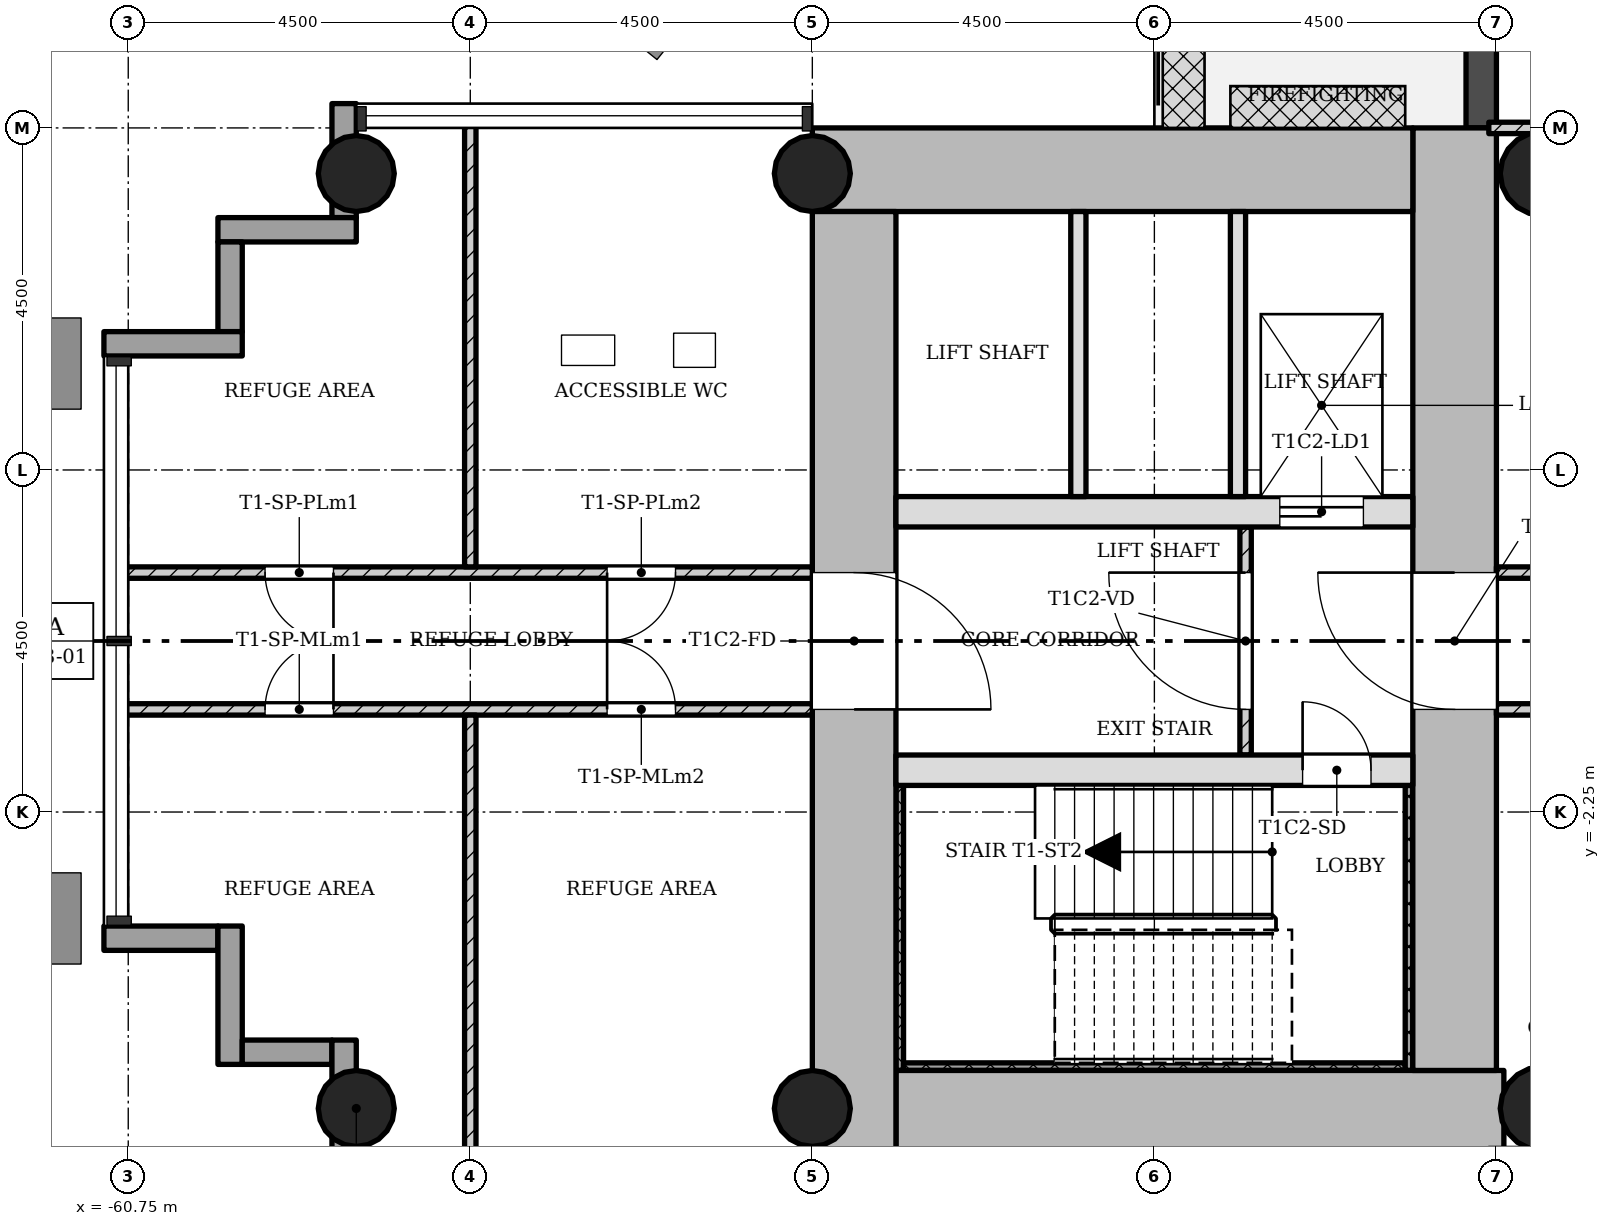
"""IFC4 building model, lengths in metres.
Left out: names, types, materials, properties, quantities, classifications, styles, units other than length and angle.
Written with IfcOpenShell. Run it as: python <this file> out.ifc"""

import sys

from ifc_helpers import new_model, si_unit, direction, frame, frame_2d, origin, origin_2d, place, context, subcontext, project, spatial, rectangle, hollow_circle, extrude, element, fill, save


model = new_model("IFC4")
c1 = context("Model", 3, precision=1e-05, world=origin(), true_north=direction((0.0, 1.0)))
c2 = subcontext(c1, "Body", "Model", "MODEL_VIEW")
j1 = project(units=[si_unit("LENGTHUNIT", "METRE"), si_unit("PLANEANGLEUNIT", "RADIAN")], contexts=[c1])
p1 = place(None, origin())
s1 = spatial("IfcSite", under=j1, at=p1, CompositionType="ELEMENT")
p2 = place(p1, origin())
s2 = spatial("IfcBuilding", under=s1, at=p2, CompositionType="ELEMENT")
p3 = place(p2, frame((0.0, 0.0, 72.1)))
s3 = spatial("IfcBuildingStorey", under=s2, at=p3, CompositionType="ELEMENT", Elevation=72.1)
p4 = place(p3, frame((-50.65, -6.2, 0.0), z_axis=(0.0, 0.0, 1.0), x_axis=(1.0, 0.0, 0.0)))
e1 = element("IfcWall", 1, at=p4, inside=s3, PredefinedType="SHEAR", context=c2, shape_type="SweptSolid", body=[
    extrude(rectangle(XDim=7.998, YDim=1.1, at=frame_2d((3.999, 0.0))), origin(), (0.0, 0.0, 1.0), 4.5),
])
p5 = place(p3, frame((-43.3, -5.65, 0.0), z_axis=(0.0, 0.0, 1.0), x_axis=(0.0, 1.0, 0.0)))
e2 = element("IfcWall", 2, at=p5, inside=s3, PredefinedType="SHEAR", context=c2, shape_type="SweptSolid", body=[
    extrude(rectangle(XDim=12.4, YDim=1.1, at=frame_2d((6.2, 0.0))), origin(), (0.0, 0.0, 1.0), 4.5),
])
p6 = place(p5, frame((4.75, 0.0, 0.0)))
e3 = element("IfcOpeningElement", 3, at=p6, cuts=e2, PredefinedType="OPENING", context=c2, shape_type="SweptSolid", body=[
    extrude(rectangle(XDim=1.8, YDim=2.1, at=frame_2d((0.9, 1.05))), frame((0.0, 0.56, 0.0), z_axis=(0.0, -1.0, 0.0), x_axis=(1.0, 0.0, 0.0)), (0.0, 0.0, 1.0), 1.12),
])
p7 = place(p3, frame((-43.85, 6.2, 0.0), z_axis=(0.0, 0.0, 1.0), x_axis=(-1.0, 0.0, 0.0)))
e4 = element("IfcWall", 4, at=p7, inside=s3, PredefinedType="SHEAR", context=c2, shape_type="SweptSolid", body=[
    extrude(rectangle(XDim=7.9, YDim=1.1, at=frame_2d((3.95, 0.0))), origin(), (0.0, 0.0, 1.0), 4.5),
])
p8 = place(p3, frame((-51.2, 5.65, 0.0), z_axis=(0.0, 0.0, 1.0), x_axis=(0.0, -1.0, 0.0)))
e5 = element("IfcWall", 5, at=p8, inside=s3, PredefinedType="SHEAR", context=c2, shape_type="SweptSolid", body=[
    extrude(rectangle(XDim=12.4, YDim=1.1, at=frame_2d((6.2, 0.0))), origin(), (0.0, 0.0, 1.0), 4.5),
])
p9 = place(p8, frame((4.75, 0.0, 0.0)))
e6 = element("IfcOpeningElement", 6, at=p9, cuts=e5, PredefinedType="OPENING", context=c2, shape_type="SweptSolid", body=[
    extrude(rectangle(XDim=1.8, YDim=2.1, at=frame_2d((0.9, 1.05))), frame((0.0, 0.56, 0.0), z_axis=(0.0, -1.0, 0.0), x_axis=(1.0, 0.0, 0.0)), (0.0, 0.0, 1.0), 1.12),
])
p10 = place(p3, frame((-50.65, -1.7, 0.0), z_axis=(0.0, 0.0, 1.0), x_axis=(1.0, 0.0, 0.0)))
e7 = element("IfcWall", 7, at=p10, inside=s3, PredefinedType="SHEAR", context=c2, shape_type="SweptSolid", body=[
    extrude(rectangle(XDim=6.8, YDim=0.4, at=frame_2d((3.4, 0.0))), origin(), (0.0, 0.0, 1.0), 4.5),
])
p11 = place(p10, frame((5.35, 0.0, 0.0)))
e8 = element("IfcOpeningElement", 8, at=p11, cuts=e7, PredefinedType="OPENING", context=c2, shape_type="SweptSolid", body=[
    extrude(rectangle(XDim=0.9, YDim=2.1, at=frame_2d((0.45, 1.05))), frame((0.0, 0.21, 0.0), z_axis=(0.0, -1.0, 0.0), x_axis=(1.0, 0.0, 0.0)), (0.0, 0.0, 1.0), 0.42),
])
p12 = place(p3, frame((-50.65, 1.7, 0.0), z_axis=(0.0, 0.0, 1.0), x_axis=(1.0, 0.0, 0.0)))
e9 = element("IfcWall", 9, at=p12, inside=s3, PredefinedType="SHEAR", context=c2, shape_type="SweptSolid", body=[
    extrude(rectangle(XDim=6.8, YDim=0.4, at=frame_2d((3.4, 0.0))), origin(), (0.0, 0.0, 1.0), 4.5),
])
p13 = place(p12, frame((5.05, 0.0, 0.0)))
e10 = element("IfcOpeningElement", 10, at=p13, cuts=e9, PredefinedType="OPENING", context=c2, shape_type="SweptSolid", body=[
    extrude(rectangle(XDim=1.1, YDim=2.1, at=frame_2d((0.55, 1.05))), frame((0.0, 0.21, 0.0), z_axis=(0.0, -1.0, 0.0), x_axis=(1.0, 0.0, 0.0)), (0.0, 0.0, 1.0), 0.42),
])
for number, where, z_axis, x_axis in (
    (11, (-51.75, -6.15, 0.0), (0.0, 0.0, 1.0), (1.0, 0.0, 0.0)),
    (12, (-51.75, 6.15, 0.0), (0.0, 0.0, 1.0), (1.0, 0.0, 0.0)),
    (13, (-57.75, -6.15, 0.0), (0.0, 0.0, 1.0), (1.0, 0.0, 0.0)),
    (14, (-57.75, 6.15, 0.0), (0.0, 0.0, 1.0), (1.0, 0.0, 0.0)),
):
    element("IfcColumn", number, at=place(p3, frame(where, z_axis=z_axis, x_axis=x_axis)), inside=s3, PredefinedType="COLUMN", context=c2, shape_type="SweptSolid", body=[
        extrude(hollow_circle(Radius=0.5, WallThickness=0.036, at=origin_2d()), origin(), (0.0, 0.0, 1.0), 4.5),
    ])
for number, where, z_axis, x_axis in (
    (15, (-42.15, -6.15, 0.0), (0.0, 0.0, 1.0), (1.0, 0.0, 0.0)),
    (16, (-42.15, 6.15, 0.0), (0.0, 0.0, 1.0), (1.0, 0.0, 0.0)),
):
    element("IfcColumn", number, at=place(p3, frame(where, z_axis=z_axis, x_axis=x_axis)), inside=s3, PredefinedType="COLUMN", context=c2, shape_type="SweptSolid", body=[
        extrude(hollow_circle(Radius=0.55, WallThickness=0.04, at=origin_2d()), origin(), (0.0, 0.0, 1.0), 4.5),
    ])
p14 = place(p3, frame((-61.07, -3.91, -0.3), z_axis=(0.0, 0.0, 1.0), x_axis=(1.0, 0.0, 0.0)))
e17 = element("IfcWall", 17, at=p14, inside=s3, PredefinedType="STANDARD", context=c2, shape_type="SweptSolid", body=[
    extrude(rectangle(XDim=1.5, YDim=0.32, at=frame_2d((0.75, 0.0))), origin(), (0.0, 0.0, 1.0), 4.5),
])
p15 = place(p3, frame((-59.41, -3.75, -0.3), z_axis=(0.0, 0.0, 1.0), x_axis=(0.0, -1.0, 0.0)))
e18 = element("IfcWall", 18, at=p15, inside=s3, PredefinedType="STANDARD", context=c2, shape_type="SweptSolid", body=[
    extrude(rectangle(XDim=1.82, YDim=0.32, at=frame_2d((0.91, 0.0))), origin(), (0.0, 0.0, 1.0), 4.5),
])
p16 = place(p3, frame((-59.25, -5.41, -0.3), z_axis=(0.0, 0.0, 1.0), x_axis=(1.0, 0.0, 0.0)))
e19 = element("IfcWall", 19, at=p16, inside=s3, PredefinedType="STANDARD", context=c2, shape_type="SweptSolid", body=[
    extrude(rectangle(XDim=1.18, YDim=0.32, at=frame_2d((0.59, 0.0))), origin(), (0.0, 0.0, 1.0), 4.5),
])
p17 = place(p3, frame((-57.91, -5.25, -0.3), z_axis=(0.0, 0.0, 1.0), x_axis=(0.0, -1.0, 0.0)))
e20 = element("IfcWall", 20, at=p17, inside=s3, PredefinedType="STANDARD", context=c2, shape_type="SweptSolid", body=[
    extrude(rectangle(XDim=1.82, YDim=0.32, at=frame_2d((0.91, 0.0))), origin(), (0.0, 0.0, 1.0), 4.5),
])
p18 = place(p3, frame((-42.95, 11.25, -0.02), z_axis=(0.0, 0.0, 1.0), x_axis=(0.0, -1.0, 0.0)))
e21 = element("IfcWall", 21, at=p18, inside=s3, PredefinedType="STANDARD", context=c2, shape_type="SweptSolid", body=[
    extrude(rectangle(XDim=4.5, YDim=0.4, at=frame_2d((2.25, 0.0))), origin(), (0.0, 0.0, 1.0), 4.22),
])
p19 = place(p18, frame((1.35, 0.0, 0.02)))
e22 = element("IfcOpeningElement", 22, at=p19, cuts=e21, PredefinedType="OPENING", context=c2, shape_type="SweptSolid", body=[
    extrude(rectangle(XDim=1.8, YDim=2.1, at=frame_2d((0.9, 1.05))), frame((0.0, 0.21, 0.0), z_axis=(0.0, -1.0, 0.0), x_axis=(1.0, 0.0, 0.0)), (0.0, 0.0, 1.0), 0.42),
])
p20 = place(p3, frame((-57.91, 7.07, -0.3), z_axis=(0.0, 0.0, 1.0), x_axis=(0.0, -1.0, 0.0)))
e23 = element("IfcWall", 23, at=p20, inside=s3, PredefinedType="STANDARD", context=c2, shape_type="SweptSolid", body=[
    extrude(rectangle(XDim=1.5, YDim=0.32, at=frame_2d((0.75, 0.0))), origin(), (0.0, 0.0, 1.0), 4.5),
])
p21 = place(p3, frame((-57.75, 5.41, -0.3), z_axis=(0.0, 0.0, 1.0), x_axis=(-1.0, 0.0, 0.0)))
e24 = element("IfcWall", 24, at=p21, inside=s3, PredefinedType="STANDARD", context=c2, shape_type="SweptSolid", body=[
    extrude(rectangle(XDim=1.82, YDim=0.32, at=frame_2d((0.91, 0.0))), origin(), (0.0, 0.0, 1.0), 4.5),
])
p22 = place(p3, frame((-59.41, 5.25, -0.3), z_axis=(0.0, 0.0, 1.0), x_axis=(0.0, -1.0, 0.0)))
e25 = element("IfcWall", 25, at=p22, inside=s3, PredefinedType="STANDARD", context=c2, shape_type="SweptSolid", body=[
    extrude(rectangle(XDim=1.18, YDim=0.32, at=frame_2d((0.59, 0.0))), origin(), (0.0, 0.0, 1.0), 4.5),
])
p23 = place(p3, frame((-59.25, 3.91, -0.3), z_axis=(0.0, 0.0, 1.0), x_axis=(-1.0, 0.0, 0.0)))
e26 = element("IfcWall", 26, at=p23, inside=s3, PredefinedType="STANDARD", context=c2, shape_type="SweptSolid", body=[
    extrude(rectangle(XDim=1.82, YDim=0.32, at=frame_2d((0.91, 0.0))), origin(), (0.0, 0.0, 1.0), 4.5),
])
p24 = place(p3, frame((-46.05, 1.5, 0.0), z_axis=(0.0, 0.0, 1.0), x_axis=(0.0, -1.0, 0.0)))
e27 = element("IfcWall", 27, at=p24, inside=s3, PredefinedType="PARTITIONING", context=c2, shape_type="SweptSolid", body=[
    extrude(rectangle(XDim=3.0, YDim=0.15, at=frame_2d((1.5, 0.0))), origin(), (0.0, 0.0, 1.0), 4.08),
])
p25 = place(p24, frame((0.6, 0.0, 0.0)))
e28 = element("IfcOpeningElement", 28, at=p25, cuts=e27, PredefinedType="OPENING", context=c2, shape_type="SweptSolid", body=[
    extrude(rectangle(XDim=1.8, YDim=2.1, at=frame_2d((0.9, 1.05))), frame((0.0, 0.085, 0.0), z_axis=(0.0, -1.0, 0.0), x_axis=(1.0, 0.0, 0.0)), (0.0, 0.0, 1.0), 0.17),
])
for number, where, z_axis, x_axis in (
    (29, (-46.15, 5.65, 0.0), (0.0, 0.0, 1.0), (0.0, -1.0, 0.0)),
    (30, (-48.25, 5.65, 0.0), (0.0, 0.0, 1.0), (0.0, -1.0, 0.0)),
):
    element("IfcWall", number, at=place(p3, frame(where, z_axis=z_axis, x_axis=x_axis)), inside=s3, PredefinedType="SOLIDWALL", context=c2, shape_type="SweptSolid", body=[
        extrude(rectangle(XDim=3.75, YDim=0.2, at=frame_2d((1.875, 0.0))), origin(), (0.0, 0.0, 1.0), 4.08),
    ])
p26 = place(p3, frame((-42.75, 0.9, 0.0), z_axis=(0.0, 0.0, 1.0), x_axis=(1.0, 0.0, 0.0)))
e31 = element("IfcWall", 31, at=p26, inside=s3, PredefinedType="PARTITIONING", context=c2, shape_type="SweptSolid", body=[
    extrude(rectangle(XDim=5.85, YDim=0.15, at=frame_2d((2.925, 0.0))), origin(), (0.0, 0.0, 1.0), 4.08),
])
p27 = place(p26, frame((2.475, 0.0, 0.0)))
e32 = element("IfcOpeningElement", 32, at=p27, cuts=e31, PredefinedType="OPENING", context=c2, shape_type="SweptSolid", body=[
    extrude(rectangle(XDim=0.9, YDim=2.1, at=frame_2d((0.45, 1.05))), frame((0.0, 0.085, 0.0), z_axis=(0.0, -1.0, 0.0), x_axis=(1.0, 0.0, 0.0)), (0.0, 0.0, 1.0), 0.17),
])
p28 = place(p3, frame((-42.75, -0.9, 0.0), z_axis=(0.0, 0.0, 1.0), x_axis=(1.0, 0.0, 0.0)))
e33 = element("IfcWall", 33, at=p28, inside=s3, PredefinedType="PARTITIONING", context=c2, shape_type="SweptSolid", body=[
    extrude(rectangle(XDim=5.85, YDim=0.15, at=frame_2d((2.925, 0.0))), origin(), (0.0, 0.0, 1.0), 4.08),
])
p29 = place(p28, frame((2.475, 0.0, 0.0)))
e34 = element("IfcOpeningElement", 34, at=p29, cuts=e33, PredefinedType="OPENING", context=c2, shape_type="SweptSolid", body=[
    extrude(rectangle(XDim=0.9, YDim=2.1, at=frame_2d((0.45, 1.05))), frame((0.0, 0.085, 0.0), z_axis=(0.0, -1.0, 0.0), x_axis=(1.0, 0.0, 0.0)), (0.0, 0.0, 1.0), 0.17),
])
p30 = place(p3, frame((-60.85, 0.9, 0.0), z_axis=(0.0, 0.0, 1.0), x_axis=(1.0, 0.0, 0.0)))
e35 = element("IfcWall", 35, at=p30, inside=s3, PredefinedType="PARTITIONING", context=c2, shape_type="SweptSolid", body=[
    extrude(rectangle(XDim=9.1, YDim=0.15, at=frame_2d((4.55, 0.0))), origin(), (0.0, 0.0, 1.0), 4.08),
])
p31 = place(p30, frame((1.9, 0.0, 0.0)))
e36 = element("IfcOpeningElement", 36, at=p31, cuts=e35, PredefinedType="OPENING", context=c2, shape_type="SweptSolid", body=[
    extrude(rectangle(XDim=0.9, YDim=2.1, at=frame_2d((0.45, 1.05))), frame((0.0, 0.085, 0.0), z_axis=(0.0, -1.0, 0.0), x_axis=(1.0, 0.0, 0.0)), (0.0, 0.0, 1.0), 0.17),
])
p32 = place(p30, frame((6.4, 0.0, 0.0)))
e37 = element("IfcOpeningElement", 37, at=p32, cuts=e35, PredefinedType="OPENING", context=c2, shape_type="SweptSolid", body=[
    extrude(rectangle(XDim=0.9, YDim=2.1, at=frame_2d((0.45, 1.05))), frame((0.0, 0.085, 0.0), z_axis=(0.0, -1.0, 0.0), x_axis=(1.0, 0.0, 0.0)), (0.0, 0.0, 1.0), 0.17),
])
p33 = place(p3, frame((-56.25, 0.975, 0.0), z_axis=(0.0, 0.0, 1.0), x_axis=(0.0, 1.0, 0.0)))
e38 = element("IfcWall", 38, at=p33, inside=s3, PredefinedType="PARTITIONING", context=c2, shape_type="SweptSolid", body=[
    extrude(rectangle(XDim=5.875, YDim=0.15, at=frame_2d((2.938, 0.0))), origin(), (0.0, 0.0, 1.0), 4.08),
])
p34 = place(p3, frame((-60.85, -0.9, 0.0), z_axis=(0.0, 0.0, 1.0), x_axis=(1.0, 0.0, 0.0)))
e39 = element("IfcWall", 39, at=p34, inside=s3, PredefinedType="PARTITIONING", context=c2, shape_type="SweptSolid", body=[
    extrude(rectangle(XDim=9.1, YDim=0.15, at=frame_2d((4.55, 0.0))), origin(), (0.0, 0.0, 1.0), 4.08),
])
p35 = place(p34, frame((1.9, 0.0, 0.0)))
e40 = element("IfcOpeningElement", 40, at=p35, cuts=e39, PredefinedType="OPENING", context=c2, shape_type="SweptSolid", body=[
    extrude(rectangle(XDim=0.9, YDim=2.1, at=frame_2d((0.45, 1.05))), frame((0.0, 0.085, 0.0), z_axis=(0.0, -1.0, 0.0), x_axis=(1.0, 0.0, 0.0)), (0.0, 0.0, 1.0), 0.17),
])
p36 = place(p34, frame((6.4, 0.0, 0.0)))
e41 = element("IfcOpeningElement", 41, at=p36, cuts=e39, PredefinedType="OPENING", context=c2, shape_type="SweptSolid", body=[
    extrude(rectangle(XDim=0.9, YDim=2.1, at=frame_2d((0.45, 1.05))), frame((0.0, 0.085, 0.0), z_axis=(0.0, -1.0, 0.0), x_axis=(1.0, 0.0, 0.0)), (0.0, 0.0, 1.0), 0.17),
])
p37 = place(p3, frame((-56.25, -0.975, 0.0), z_axis=(0.0, 0.0, 1.0), x_axis=(0.0, -1.0, 0.0)))
e42 = element("IfcWall", 42, at=p37, inside=s3, PredefinedType="PARTITIONING", context=c2, shape_type="SweptSolid", body=[
    extrude(rectangle(XDim=5.875, YDim=0.15, at=frame_2d((2.938, 0.0))), origin(), (0.0, 0.0, 1.0), 4.08),
])
p38 = place(p3, frame((-42.85, 6.75, 0.0), z_axis=(0.0, 0.0, 1.0), x_axis=(1.0, 0.0, 0.0)))
e43 = element("IfcWall", 43, at=p38, inside=s3, PredefinedType="PARTITIONING", context=c2, shape_type="SweptSolid", body=[
    extrude(rectangle(XDim=13.7, YDim=0.15, at=frame_2d((6.85, 0.0))), origin(), (0.0, 0.0, 1.0), 4.08),
])
p39 = place(p38, frame((5.95, 0.0, 0.0)))
e44 = element("IfcOpeningElement", 44, at=p39, cuts=e43, PredefinedType="OPENING", context=c2, shape_type="SweptSolid", body=[
    extrude(rectangle(XDim=1.8, YDim=2.1, at=frame_2d((0.9, 1.05))), frame((0.0, 0.085, 0.0), z_axis=(0.0, -1.0, 0.0), x_axis=(1.0, 0.0, 0.0)), (0.0, 0.0, 1.0), 0.17),
])
p40 = place(p3, frame((-50.6, -1.9, 0.0), z_axis=(0.0, 0.0, 1.0), x_axis=(0.0, -1.0, 0.0)))
e45 = element("IfcWall", 45, at=p40, inside=s3, PredefinedType="SHEAR", context=c2, shape_type="SweptSolid", body=[
    extrude(rectangle(XDim=3.75, YDim=0.1, at=frame_2d((1.875, 0.0))), origin(), (0.0, 0.0, 1.0), 4.5),
])
p41 = place(p3, frame((-43.95, -5.6, 0.0), z_axis=(0.0, 0.0, 1.0), x_axis=(-1.0, 0.0, 0.0)))
e46 = element("IfcWall", 46, at=p41, inside=s3, PredefinedType="SHEAR", context=c2, shape_type="SweptSolid", body=[
    extrude(rectangle(XDim=6.6, YDim=0.1, at=frame_2d((3.3, 0.0))), origin(), (0.0, 0.0, 1.0), 4.5),
])
p42 = place(p3, frame((-43.9, -1.9, 0.0), z_axis=(0.0, 0.0, 1.0), x_axis=(0.0, -1.0, 0.0)))
e47 = element("IfcWall", 47, at=p42, inside=s3, PredefinedType="SHEAR", context=c2, shape_type="SweptSolid", body=[
    extrude(rectangle(XDim=3.75, YDim=0.1, at=frame_2d((1.875, 0.0))), origin(), (0.0, 0.0, 1.0), 4.5),
])
p43 = place(p25, origin())
e48 = element("IfcDoor", 48, at=p43, inside=s3, OperationType="SINGLE_SWING_LEFT", PredefinedType="DOOR", context=c2, shape_type="SweptSolid", body=[
    extrude(rectangle(XDim=1.8, YDim=2.1, at=frame_2d((0.9, 1.05))), frame((0.0, 0.025, 0.0), z_axis=(0.0, -1.0, 0.0), x_axis=(1.0, 0.0, 0.0)), (0.0, 0.0, 1.0), 0.05),
])
fill(e28, e48)
p44 = place(p31, origin())
e49 = element("IfcDoor", 49, at=p44, inside=s3, OperationType="SINGLE_SWING_RIGHT", PredefinedType="DOOR", context=c2, shape_type="SweptSolid", body=[
    extrude(rectangle(XDim=0.9, YDim=2.1, at=frame_2d((0.45, 1.05))), frame((0.0, 0.025, 0.0), z_axis=(0.0, -1.0, 0.0), x_axis=(1.0, 0.0, 0.0)), (0.0, 0.0, 1.0), 0.05),
])
fill(e36, e49)
p45 = place(p32, origin())
e50 = element("IfcDoor", 50, at=p45, inside=s3, OperationType="SINGLE_SWING_LEFT", PredefinedType="DOOR", context=c2, shape_type="SweptSolid", body=[
    extrude(rectangle(XDim=0.9, YDim=2.1, at=frame_2d((0.45, 1.05))), frame((0.0, 0.025, 0.0), z_axis=(0.0, -1.0, 0.0), x_axis=(1.0, 0.0, 0.0)), (0.0, 0.0, 1.0), 0.05),
])
fill(e37, e50)
p46 = place(p35, origin())
e51 = element("IfcDoor", 51, at=p46, inside=s3, OperationType="SINGLE_SWING_LEFT", PredefinedType="DOOR", context=c2, shape_type="SweptSolid", body=[
    extrude(rectangle(XDim=0.9, YDim=2.1, at=frame_2d((0.45, 1.05))), frame((0.0, 0.025, 0.0), z_axis=(0.0, -1.0, 0.0), x_axis=(1.0, 0.0, 0.0)), (0.0, 0.0, 1.0), 0.05),
])
fill(e40, e51)
p47 = place(p36, origin())
e52 = element("IfcDoor", 52, at=p47, inside=s3, OperationType="SINGLE_SWING_RIGHT", PredefinedType="DOOR", context=c2, shape_type="SweptSolid", body=[
    extrude(rectangle(XDim=0.9, YDim=2.1, at=frame_2d((0.45, 1.05))), frame((0.0, 0.025, 0.0), z_axis=(0.0, -1.0, 0.0), x_axis=(1.0, 0.0, 0.0)), (0.0, 0.0, 1.0), 0.05),
])
fill(e41, e52)
p48 = place(p11, origin())
e53 = element("IfcDoor", 53, at=p48, inside=s3, OperationType="SINGLE_SWING_RIGHT", PredefinedType="DOOR", context=c2, shape_type="SweptSolid", body=[
    extrude(rectangle(XDim=0.9, YDim=2.1, at=frame_2d((0.45, 1.05))), frame((0.0, 0.025, 0.0), z_axis=(0.0, -1.0, 0.0), x_axis=(1.0, 0.0, 0.0)), (0.0, 0.0, 1.0), 0.05),
])
fill(e8, e53)
p49 = place(p13, origin())
e54 = element("IfcDoor", 54, at=p49, inside=s3, OperationType="SLIDING_TO_LEFT", PredefinedType="DOOR", context=c2, shape_type="SweptSolid", body=[
    extrude(rectangle(XDim=1.1, YDim=2.1, at=frame_2d((0.55, 1.05))), frame((0.0, 0.025, 0.0), z_axis=(0.0, -1.0, 0.0), x_axis=(1.0, 0.0, 0.0)), (0.0, 0.0, 1.0), 0.05),
])
fill(e10, e54)
p50 = place(p6, origin())
e55 = element("IfcDoor", 55, at=p50, inside=s3, OperationType="SINGLE_SWING_LEFT", PredefinedType="DOOR", context=c2, shape_type="SweptSolid", body=[
    extrude(rectangle(XDim=1.8, YDim=2.1, at=frame_2d((0.9, 1.05))), frame((0.0, 0.025, 0.0), z_axis=(0.0, -1.0, 0.0), x_axis=(1.0, 0.0, 0.0)), (0.0, 0.0, 1.0), 0.05),
])
fill(e3, e55)
p51 = place(p9, origin())
e56 = element("IfcDoor", 56, at=p51, inside=s3, OperationType="SINGLE_SWING_LEFT", PredefinedType="DOOR", context=c2, shape_type="SweptSolid", body=[
    extrude(rectangle(XDim=1.8, YDim=2.1, at=frame_2d((0.9, 1.05))), frame((0.0, 0.025, 0.0), z_axis=(0.0, -1.0, 0.0), x_axis=(1.0, 0.0, 0.0)), (0.0, 0.0, 1.0), 0.05),
])
fill(e6, e56)
save(model, sys.argv[1])
